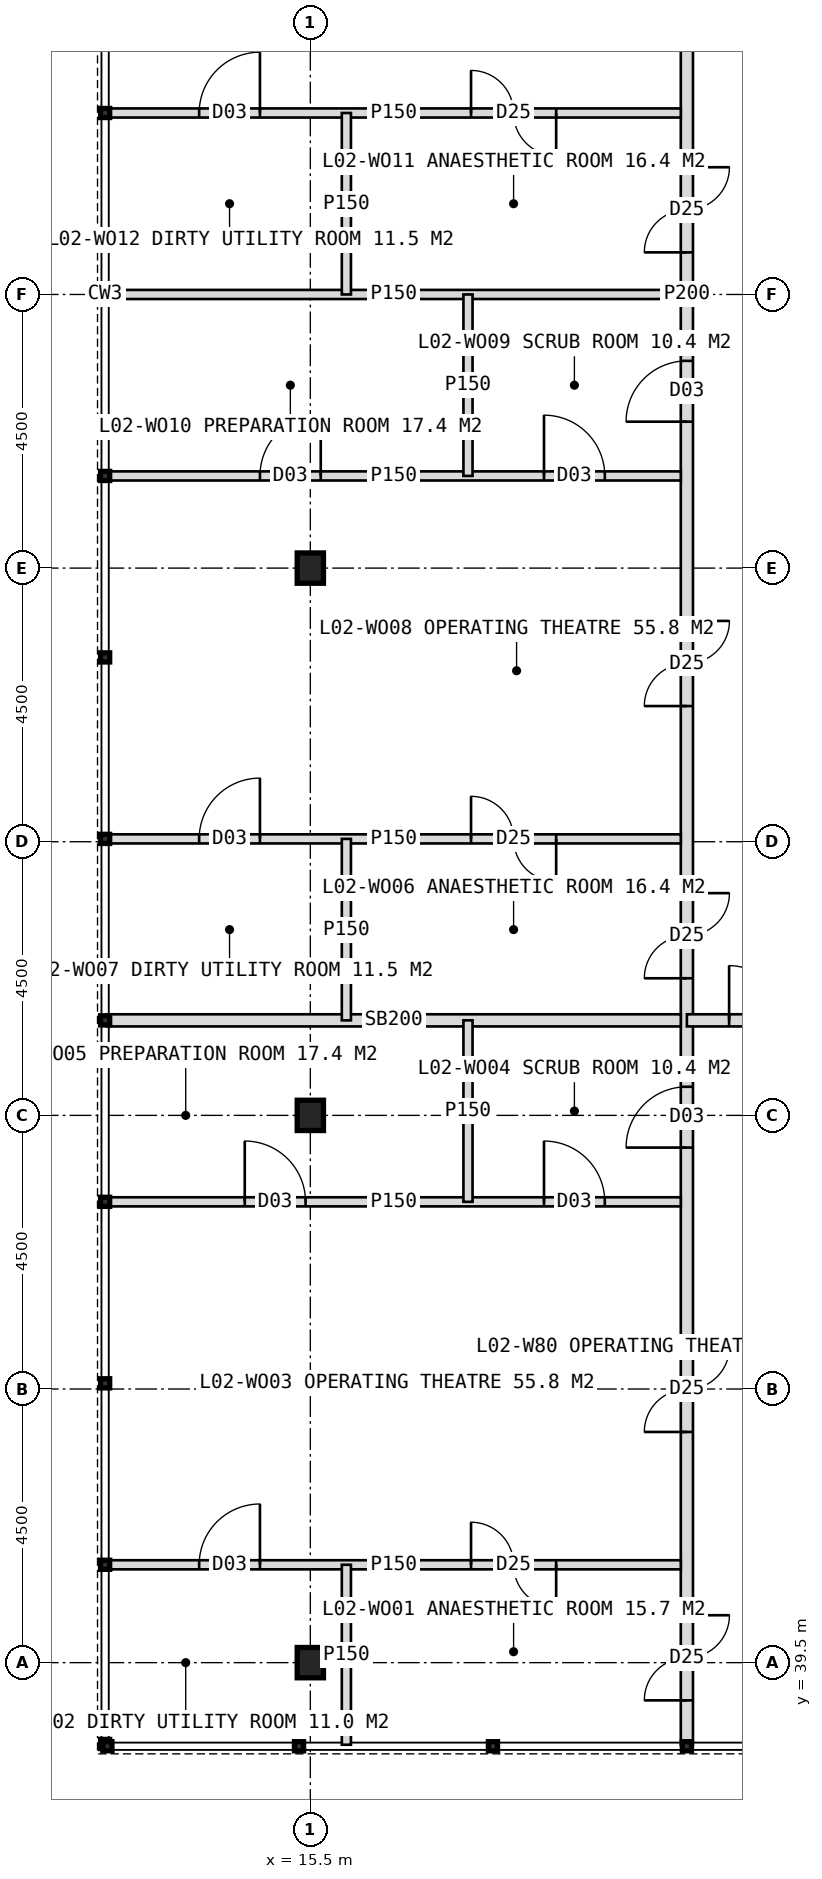
"""IFC4 building model, lengths in metres.
Left out: names, types, materials, properties, quantities, classifications, styles, units other than length and angle.
Written with IfcOpenShell. Run it as: python <this file> out.ifc"""

import sys

from ifc_helpers import new_model, si_unit, direction, frame, frame_2d, origin, origin_2d, place, context, subcontext, project, spatial, rectangle, i_section, extrude, element, fill, save


model = new_model("IFC4")
c1 = context("Model", 3, precision=1e-05, world=origin(), true_north=direction((0.0, 1.0)))
c2 = subcontext(c1, "Body", "Model", "MODEL_VIEW")
j1 = project(units=[si_unit("LENGTHUNIT", "METRE"), si_unit("PLANEANGLEUNIT", "RADIAN")], contexts=[c1])
p1 = place(None, origin())
s1 = spatial("IfcSite", under=j1, at=p1, CompositionType="ELEMENT")
p2 = place(p1, origin())
s2 = spatial("IfcBuilding", under=s1, at=p2, CompositionType="ELEMENT")
p3 = place(p2, frame((0.0, 0.0, 11.0)))
s3 = spatial("IfcBuildingStorey", under=s2, at=p3, CompositionType="ELEMENT", Elevation=11.0)
for number, where, z_axis, x_axis in (
    (1, (15.5, 39.5, 0.0), (0.0, 0.0, 1.0), (1.0, 0.0, 0.0)),
    (2, (15.5, 48.5, 0.0), (0.0, 0.0, 1.0), (1.0, 0.0, 0.0)),
    (3, (15.5, 57.5, 0.0), (0.0, 0.0, 1.0), (1.0, 0.0, 0.0)),
):
    element("IfcColumn", number, at=place(p3, frame(where, z_axis=z_axis, x_axis=x_axis)), inside=s3, PredefinedType="COLUMN", context=c2, shape_type="SweptSolid", body=[
        extrude(i_section(OverallWidth=0.432, OverallDepth=0.498, WebThickness=0.056, FlangeThickness=0.089, FilletRadius=0.015, at=origin_2d()), origin(), (0.0, 0.0, 1.0), 5.5),
    ])
p4 = place(p3, frame((21.693, 38.15, 0.0), z_axis=(0.0, 0.0, 1.0), x_axis=(0.0, 1.0, 0.0)))
e4 = element("IfcWall", 4, at=p4, inside=s3, PredefinedType="PARTITIONING", context=c2, shape_type="SweptSolid", body=[
    extrude(rectangle(XDim=47.7, YDim=0.2, at=frame_2d((23.85, 0.0))), origin(), (0.0, 0.0, 1.0), 5.2),
])
p5 = place(p4, frame((45.7, 0.0, 0.0)))
e5 = element("IfcOpeningElement", 5, at=p5, cuts=e4, PredefinedType="OPENING", context=c2, shape_type="SweptSolid", body=[
    extrude(rectangle(XDim=1.2, YDim=2.1, at=frame_2d((0.6, 1.05))), frame((0.0, 0.11, 0.0), z_axis=(0.0, -1.0, 0.0), x_axis=(1.0, 0.0, 0.0)), (0.0, 0.0, 1.0), 0.22),
])
p6 = place(p4, frame((36.244, 0.0, 0.0)))
e6 = element("IfcOpeningElement", 6, at=p6, cuts=e4, PredefinedType="OPENING", context=c2, shape_type="SweptSolid", body=[
    extrude(rectangle(XDim=1.0, YDim=2.1, at=frame_2d((0.5, 1.05))), frame((0.0, 0.11, 0.0), z_axis=(0.0, -1.0, 0.0), x_axis=(1.0, 0.0, 0.0)), (0.0, 0.0, 1.0), 0.22),
])
p7 = place(p4, frame((0.73, 0.0, 0.0)))
e7 = element("IfcOpeningElement", 7, at=p7, cuts=e4, PredefinedType="OPENING", context=c2, shape_type="SweptSolid", body=[
    extrude(rectangle(XDim=1.4, YDim=2.2, at=frame_2d((0.7, 1.1))), frame((0.0, 0.11, 0.0), z_axis=(0.0, -1.0, 0.0), x_axis=(1.0, 0.0, 0.0)), (0.0, 0.0, 1.0), 0.22),
])
p8 = place(p4, frame((5.144, 0.0, 0.0)))
e8 = element("IfcOpeningElement", 8, at=p8, cuts=e4, PredefinedType="OPENING", context=c2, shape_type="SweptSolid", body=[
    extrude(rectangle(XDim=1.4, YDim=2.2, at=frame_2d((0.7, 1.1))), frame((0.0, 0.11, 0.0), z_axis=(0.0, -1.0, 0.0), x_axis=(1.0, 0.0, 0.0)), (0.0, 0.0, 1.0), 0.22),
])
p9 = place(p4, frame((9.82, 0.0, 0.0)))
e9 = element("IfcOpeningElement", 9, at=p9, cuts=e4, PredefinedType="OPENING", context=c2, shape_type="SweptSolid", body=[
    extrude(rectangle(XDim=1.0, YDim=2.1, at=frame_2d((0.5, 1.05))), frame((0.0, 0.11, 0.0), z_axis=(0.0, -1.0, 0.0), x_axis=(1.0, 0.0, 0.0)), (0.0, 0.0, 1.0), 0.22),
])
p10 = place(p4, frame((12.605, 0.0, 0.0)))
e10 = element("IfcOpeningElement", 10, at=p10, cuts=e4, PredefinedType="OPENING", context=c2, shape_type="SweptSolid", body=[
    extrude(rectangle(XDim=1.4, YDim=2.2, at=frame_2d((0.7, 1.1))), frame((0.0, 0.11, 0.0), z_axis=(0.0, -1.0, 0.0), x_axis=(1.0, 0.0, 0.0)), (0.0, 0.0, 1.0), 0.22),
])
p11 = place(p4, frame((17.081, 0.0, 0.0)))
e11 = element("IfcOpeningElement", 11, at=p11, cuts=e4, PredefinedType="OPENING", context=c2, shape_type="SweptSolid", body=[
    extrude(rectangle(XDim=1.4, YDim=2.2, at=frame_2d((0.7, 1.1))), frame((0.0, 0.11, 0.0), z_axis=(0.0, -1.0, 0.0), x_axis=(1.0, 0.0, 0.0)), (0.0, 0.0, 1.0), 0.22),
])
p12 = place(p4, frame((21.758, 0.0, 0.0)))
e12 = element("IfcOpeningElement", 12, at=p12, cuts=e4, PredefinedType="OPENING", context=c2, shape_type="SweptSolid", body=[
    extrude(rectangle(XDim=1.0, YDim=2.1, at=frame_2d((0.5, 1.05))), frame((0.0, 0.11, 0.0), z_axis=(0.0, -1.0, 0.0), x_axis=(1.0, 0.0, 0.0)), (0.0, 0.0, 1.0), 0.22),
])
p13 = place(p4, frame((24.542, 0.0, 0.0)))
e13 = element("IfcOpeningElement", 13, at=p13, cuts=e4, PredefinedType="OPENING", context=c2, shape_type="SweptSolid", body=[
    extrude(rectangle(XDim=1.4, YDim=2.2, at=frame_2d((0.7, 1.1))), frame((0.0, 0.11, 0.0), z_axis=(0.0, -1.0, 0.0), x_axis=(1.0, 0.0, 0.0)), (0.0, 0.0, 1.0), 0.22),
])
p14 = place(p4, frame((29.019, 0.0, 0.0)))
e14 = element("IfcOpeningElement", 14, at=p14, cuts=e4, PredefinedType="OPENING", context=c2, shape_type="SweptSolid", body=[
    extrude(rectangle(XDim=1.4, YDim=2.2, at=frame_2d((0.7, 1.1))), frame((0.0, 0.11, 0.0), z_axis=(0.0, -1.0, 0.0), x_axis=(1.0, 0.0, 0.0)), (0.0, 0.0, 1.0), 0.22),
])
p15 = place(p4, frame((33.695, 0.0, 0.0)))
e15 = element("IfcOpeningElement", 15, at=p15, cuts=e4, PredefinedType="OPENING", context=c2, shape_type="SweptSolid", body=[
    extrude(rectangle(XDim=1.0, YDim=2.1, at=frame_2d((0.5, 1.05))), frame((0.0, 0.11, 0.0), z_axis=(0.0, -1.0, 0.0), x_axis=(1.0, 0.0, 0.0)), (0.0, 0.0, 1.0), 0.22),
])
p16 = place(p3, frame((21.693, 50.062, 0.0), z_axis=(0.0, 0.0, 1.0), x_axis=(1.0, 0.0, 0.0)))
e16 = element("IfcWall", 16, at=p16, inside=s3, PredefinedType="SOLIDWALL", context=c2, shape_type="SweptSolid", body=[
    extrude(rectangle(XDim=3.189, YDim=0.2, at=frame_2d((1.594, 0.0))), origin(), (0.0, 0.0, 1.0), 5.2),
])
p17 = place(p16, frame((0.695, 0.0, 0.0)))
e17 = element("IfcOpeningElement", 17, at=p17, cuts=e16, PredefinedType="OPENING", context=c2, shape_type="SweptSolid", body=[
    extrude(rectangle(XDim=1.8, YDim=2.2, at=frame_2d((0.9, 1.1))), frame((0.0, 0.11, 0.0), z_axis=(0.0, -1.0, 0.0), x_axis=(1.0, 0.0, 0.0)), (0.0, 0.0, 1.0), 0.22),
])
p18 = place(p3, frame((12.15, 41.109, 0.0), z_axis=(0.0, 0.0, 1.0), x_axis=(1.0, 0.0, 0.0)))
e18 = element("IfcWall", 18, at=p18, inside=s3, PredefinedType="PARTITIONING", context=c2, shape_type="SweptSolid", body=[
    extrude(rectangle(XDim=9.443, YDim=0.15, at=frame_2d((4.722, 0.0))), origin(), (0.0, 0.0, 1.0), 5.2),
])
p19 = place(p18, frame((5.993, 0.0, 0.0)))
e19 = element("IfcOpeningElement", 19, at=p19, cuts=e18, PredefinedType="OPENING", context=c2, shape_type="SweptSolid", body=[
    extrude(rectangle(XDim=1.4, YDim=2.2, at=frame_2d((0.7, 1.1))), frame((0.0, 0.085, 0.0), z_axis=(0.0, -1.0, 0.0), x_axis=(1.0, 0.0, 0.0)), (0.0, 0.0, 1.0), 0.17),
])
p20 = place(p18, frame((1.521, 0.0, 0.0)))
e20 = element("IfcOpeningElement", 20, at=p20, cuts=e18, PredefinedType="OPENING", context=c2, shape_type="SweptSolid", body=[
    extrude(rectangle(XDim=1.0, YDim=2.1, at=frame_2d((0.5, 1.05))), frame((0.0, 0.085, 0.0), z_axis=(0.0, -1.0, 0.0), x_axis=(1.0, 0.0, 0.0)), (0.0, 0.0, 1.0), 0.17),
])
p21 = place(p3, frame((12.15, 47.078, 0.0), z_axis=(0.0, 0.0, 1.0), x_axis=(1.0, 0.0, 0.0)))
e21 = element("IfcWall", 21, at=p21, inside=s3, PredefinedType="PARTITIONING", context=c2, shape_type="SweptSolid", body=[
    extrude(rectangle(XDim=9.443, YDim=0.15, at=frame_2d((4.722, 0.0))), origin(), (0.0, 0.0, 1.0), 5.2),
])
p22 = place(p21, frame((7.193, 0.0, 0.0)))
e22 = element("IfcOpeningElement", 22, at=p22, cuts=e21, PredefinedType="OPENING", context=c2, shape_type="SweptSolid", body=[
    extrude(rectangle(XDim=1.0, YDim=2.1, at=frame_2d((0.5, 1.05))), frame((0.0, 0.085, 0.0), z_axis=(0.0, -1.0, 0.0), x_axis=(1.0, 0.0, 0.0)), (0.0, 0.0, 1.0), 0.17),
])
p23 = place(p21, frame((2.271, 0.0, 0.0)))
e23 = element("IfcOpeningElement", 23, at=p23, cuts=e21, PredefinedType="OPENING", context=c2, shape_type="SweptSolid", body=[
    extrude(rectangle(XDim=1.0, YDim=2.1, at=frame_2d((0.5, 1.05))), frame((0.0, 0.085, 0.0), z_axis=(0.0, -1.0, 0.0), x_axis=(1.0, 0.0, 0.0)), (0.0, 0.0, 1.0), 0.17),
])
p24 = place(p3, frame((12.15, 50.062, 0.0), z_axis=(0.0, 0.0, 1.0), x_axis=(1.0, 0.0, 0.0)))
e24 = element("IfcWall", 24, at=p24, inside=s3, PredefinedType="SOLIDWALL", context=c2, shape_type="SweptSolid", body=[
    extrude(rectangle(XDim=9.443, YDim=0.2, at=frame_2d((4.722, 0.0))), origin(), (0.0, 0.0, 1.0), 5.2),
])
p25 = place(p3, frame((12.15, 53.047, 0.0), z_axis=(0.0, 0.0, 1.0), x_axis=(1.0, 0.0, 0.0)))
e25 = element("IfcWall", 25, at=p25, inside=s3, PredefinedType="PARTITIONING", context=c2, shape_type="SweptSolid", body=[
    extrude(rectangle(XDim=9.443, YDim=0.15, at=frame_2d((4.722, 0.0))), origin(), (0.0, 0.0, 1.0), 5.2),
])
p26 = place(p25, frame((5.993, 0.0, 0.0)))
e26 = element("IfcOpeningElement", 26, at=p26, cuts=e25, PredefinedType="OPENING", context=c2, shape_type="SweptSolid", body=[
    extrude(rectangle(XDim=1.4, YDim=2.2, at=frame_2d((0.7, 1.1))), frame((0.0, 0.085, 0.0), z_axis=(0.0, -1.0, 0.0), x_axis=(1.0, 0.0, 0.0)), (0.0, 0.0, 1.0), 0.17),
])
p27 = place(p25, frame((1.521, 0.0, 0.0)))
e27 = element("IfcOpeningElement", 27, at=p27, cuts=e25, PredefinedType="OPENING", context=c2, shape_type="SweptSolid", body=[
    extrude(rectangle(XDim=1.0, YDim=2.1, at=frame_2d((0.5, 1.05))), frame((0.0, 0.085, 0.0), z_axis=(0.0, -1.0, 0.0), x_axis=(1.0, 0.0, 0.0)), (0.0, 0.0, 1.0), 0.17),
])
p28 = place(p3, frame((12.15, 59.016, 0.0), z_axis=(0.0, 0.0, 1.0), x_axis=(1.0, 0.0, 0.0)))
e28 = element("IfcWall", 28, at=p28, inside=s3, PredefinedType="PARTITIONING", context=c2, shape_type="SweptSolid", body=[
    extrude(rectangle(XDim=9.443, YDim=0.15, at=frame_2d((4.722, 0.0))), origin(), (0.0, 0.0, 1.0), 5.2),
])
p29 = place(p28, frame((7.193, 0.0, 0.0)))
e29 = element("IfcOpeningElement", 29, at=p29, cuts=e28, PredefinedType="OPENING", context=c2, shape_type="SweptSolid", body=[
    extrude(rectangle(XDim=1.0, YDim=2.1, at=frame_2d((0.5, 1.05))), frame((0.0, 0.085, 0.0), z_axis=(0.0, -1.0, 0.0), x_axis=(1.0, 0.0, 0.0)), (0.0, 0.0, 1.0), 0.17),
])
p30 = place(p28, frame((2.521, 0.0, 0.0)))
e30 = element("IfcOpeningElement", 30, at=p30, cuts=e28, PredefinedType="OPENING", context=c2, shape_type="SweptSolid", body=[
    extrude(rectangle(XDim=1.0, YDim=2.1, at=frame_2d((0.5, 1.05))), frame((0.0, 0.085, 0.0), z_axis=(0.0, -1.0, 0.0), x_axis=(1.0, 0.0, 0.0)), (0.0, 0.0, 1.0), 0.17),
])
p31 = place(p3, frame((12.15, 62.0, 0.0), z_axis=(0.0, 0.0, 1.0), x_axis=(1.0, 0.0, 0.0)))
e31 = element("IfcWall", 31, at=p31, inside=s3, PredefinedType="PARTITIONING", context=c2, shape_type="SweptSolid", body=[
    extrude(rectangle(XDim=9.443, YDim=0.15, at=frame_2d((4.722, 0.0))), origin(), (0.0, 0.0, 1.0), 5.2),
])
p32 = place(p3, frame((12.15, 64.984, 0.0), z_axis=(0.0, 0.0, 1.0), x_axis=(1.0, 0.0, 0.0)))
e32 = element("IfcWall", 32, at=p32, inside=s3, PredefinedType="PARTITIONING", context=c2, shape_type="SweptSolid", body=[
    extrude(rectangle(XDim=9.443, YDim=0.15, at=frame_2d((4.722, 0.0))), origin(), (0.0, 0.0, 1.0), 5.2),
])
p33 = place(p32, frame((5.993, 0.0, 0.0)))
e33 = element("IfcOpeningElement", 33, at=p33, cuts=e32, PredefinedType="OPENING", context=c2, shape_type="SweptSolid", body=[
    extrude(rectangle(XDim=1.4, YDim=2.2, at=frame_2d((0.7, 1.1))), frame((0.0, 0.085, 0.0), z_axis=(0.0, -1.0, 0.0), x_axis=(1.0, 0.0, 0.0)), (0.0, 0.0, 1.0), 0.17),
])
p34 = place(p32, frame((1.521, 0.0, 0.0)))
e34 = element("IfcOpeningElement", 34, at=p34, cuts=e32, PredefinedType="OPENING", context=c2, shape_type="SweptSolid", body=[
    extrude(rectangle(XDim=1.0, YDim=2.1, at=frame_2d((0.5, 1.05))), frame((0.0, 0.085, 0.0), z_axis=(0.0, -1.0, 0.0), x_axis=(1.0, 0.0, 0.0)), (0.0, 0.0, 1.0), 0.17),
])
p35 = place(p3, frame((16.093, 38.15, 0.0), z_axis=(0.0, 0.0, 1.0), x_axis=(0.0, 1.0, 0.0)))
e35 = element("IfcWall", 35, at=p35, inside=s3, PredefinedType="PARTITIONING", context=c2, shape_type="SweptSolid", body=[
    extrude(rectangle(XDim=2.959, YDim=0.15, at=frame_2d((1.48, 0.0))), origin(), (0.0, 0.0, 1.0), 5.2),
])
for number, where, z_axis, x_axis in (
    (36, (16.093, 50.062, 0.0), (0.0, 0.0, 1.0), (0.0, 1.0, 0.0)),
    (37, (16.093, 62.0, 0.0), (0.0, 0.0, 1.0), (0.0, 1.0, 0.0)),
    (38, (18.093, 47.078, 0.0), (0.0, 0.0, 1.0), (0.0, 1.0, 0.0)),
    (39, (18.093, 59.016, 0.0), (0.0, 0.0, 1.0), (0.0, 1.0, 0.0)),
):
    element("IfcWall", number, at=place(p3, frame(where, z_axis=z_axis, x_axis=x_axis)), inside=s3, PredefinedType="PARTITIONING", context=c2, shape_type="SweptSolid", body=[
        extrude(rectangle(XDim=2.984, YDim=0.15, at=frame_2d((1.492, 0.0))), origin(), (0.0, 0.0, 1.0), 5.2),
    ])
p36 = place(p17, origin())
e40 = element("IfcDoor", 40, at=p36, inside=s3, OperationType="DOUBLE_DOOR_DOUBLE_SWING", PredefinedType="DOOR", context=c2, shape_type="SweptSolid", body=[
    extrude(rectangle(XDim=1.8, YDim=2.2, at=frame_2d((0.9, 1.1))), frame((0.0, 0.025, 0.0), z_axis=(0.0, -1.0, 0.0), x_axis=(1.0, 0.0, 0.0)), (0.0, 0.0, 1.0), 0.05),
])
fill(e17, e40)
p37 = place(p7, origin())
e41 = element("IfcDoor", 41, at=p37, inside=s3, OperationType="DOUBLE_DOOR_SINGLE_SWING", PredefinedType="DOOR", context=c2, shape_type="SweptSolid", body=[
    extrude(rectangle(XDim=1.4, YDim=2.2, at=frame_2d((0.7, 1.1))), frame((0.0, 0.025, 0.0), z_axis=(0.0, -1.0, 0.0), x_axis=(1.0, 0.0, 0.0)), (0.0, 0.0, 1.0), 0.05),
])
fill(e7, e41)
p38 = place(p19, origin())
e42 = element("IfcDoor", 42, at=p38, inside=s3, OperationType="DOUBLE_DOOR_SINGLE_SWING", PredefinedType="DOOR", context=c2, shape_type="SweptSolid", body=[
    extrude(rectangle(XDim=1.4, YDim=2.2, at=frame_2d((0.7, 1.1))), frame((0.0, 0.025, 0.0), z_axis=(0.0, -1.0, 0.0), x_axis=(1.0, 0.0, 0.0)), (0.0, 0.0, 1.0), 0.05),
])
fill(e19, e42)
p39 = place(p20, origin())
e43 = element("IfcDoor", 43, at=p39, inside=s3, OperationType="SINGLE_SWING_RIGHT", PredefinedType="DOOR", context=c2, shape_type="SweptSolid", body=[
    extrude(rectangle(XDim=1.0, YDim=2.1, at=frame_2d((0.5, 1.05))), frame((0.0, 0.025, 0.0), z_axis=(0.0, -1.0, 0.0), x_axis=(1.0, 0.0, 0.0)), (0.0, 0.0, 1.0), 0.05),
])
fill(e20, e43)
p40 = place(p8, origin())
e44 = element("IfcDoor", 44, at=p40, inside=s3, OperationType="DOUBLE_DOOR_SINGLE_SWING", PredefinedType="DOOR", context=c2, shape_type="SweptSolid", body=[
    extrude(rectangle(XDim=1.4, YDim=2.2, at=frame_2d((0.7, 1.1))), frame((0.0, 0.025, 0.0), z_axis=(0.0, -1.0, 0.0), x_axis=(1.0, 0.0, 0.0)), (0.0, 0.0, 1.0), 0.05),
])
fill(e8, e44)
p41 = place(p9, origin())
e45 = element("IfcDoor", 45, at=p41, inside=s3, OperationType="SINGLE_SWING_LEFT", PredefinedType="DOOR", context=c2, shape_type="SweptSolid", body=[
    extrude(rectangle(XDim=1.0, YDim=2.1, at=frame_2d((0.5, 1.05))), frame((0.0, 0.025, 0.0), z_axis=(0.0, -1.0, 0.0), x_axis=(1.0, 0.0, 0.0)), (0.0, 0.0, 1.0), 0.05),
])
fill(e9, e45)
p42 = place(p22, origin())
e46 = element("IfcDoor", 46, at=p42, inside=s3, OperationType="SINGLE_SWING_LEFT", PredefinedType="DOOR", context=c2, shape_type="SweptSolid", body=[
    extrude(rectangle(XDim=1.0, YDim=2.1, at=frame_2d((0.5, 1.05))), frame((0.0, 0.025, 0.0), z_axis=(0.0, -1.0, 0.0), x_axis=(1.0, 0.0, 0.0)), (0.0, 0.0, 1.0), 0.05),
])
fill(e22, e46)
p43 = place(p23, origin())
e47 = element("IfcDoor", 47, at=p43, inside=s3, OperationType="SINGLE_SWING_LEFT", PredefinedType="DOOR", context=c2, shape_type="SweptSolid", body=[
    extrude(rectangle(XDim=1.0, YDim=2.1, at=frame_2d((0.5, 1.05))), frame((0.0, 0.025, 0.0), z_axis=(0.0, -1.0, 0.0), x_axis=(1.0, 0.0, 0.0)), (0.0, 0.0, 1.0), 0.05),
])
fill(e23, e47)
p44 = place(p10, origin())
e48 = element("IfcDoor", 48, at=p44, inside=s3, OperationType="DOUBLE_DOOR_SINGLE_SWING", PredefinedType="DOOR", context=c2, shape_type="SweptSolid", body=[
    extrude(rectangle(XDim=1.4, YDim=2.2, at=frame_2d((0.7, 1.1))), frame((0.0, 0.025, 0.0), z_axis=(0.0, -1.0, 0.0), x_axis=(1.0, 0.0, 0.0)), (0.0, 0.0, 1.0), 0.05),
])
fill(e10, e48)
p45 = place(p26, origin())
e49 = element("IfcDoor", 49, at=p45, inside=s3, OperationType="DOUBLE_DOOR_SINGLE_SWING", PredefinedType="DOOR", context=c2, shape_type="SweptSolid", body=[
    extrude(rectangle(XDim=1.4, YDim=2.2, at=frame_2d((0.7, 1.1))), frame((0.0, 0.025, 0.0), z_axis=(0.0, -1.0, 0.0), x_axis=(1.0, 0.0, 0.0)), (0.0, 0.0, 1.0), 0.05),
])
fill(e26, e49)
p46 = place(p27, origin())
e50 = element("IfcDoor", 50, at=p46, inside=s3, OperationType="SINGLE_SWING_RIGHT", PredefinedType="DOOR", context=c2, shape_type="SweptSolid", body=[
    extrude(rectangle(XDim=1.0, YDim=2.1, at=frame_2d((0.5, 1.05))), frame((0.0, 0.025, 0.0), z_axis=(0.0, -1.0, 0.0), x_axis=(1.0, 0.0, 0.0)), (0.0, 0.0, 1.0), 0.05),
])
fill(e27, e50)
p47 = place(p11, origin())
e51 = element("IfcDoor", 51, at=p47, inside=s3, OperationType="DOUBLE_DOOR_SINGLE_SWING", PredefinedType="DOOR", context=c2, shape_type="SweptSolid", body=[
    extrude(rectangle(XDim=1.4, YDim=2.2, at=frame_2d((0.7, 1.1))), frame((0.0, 0.025, 0.0), z_axis=(0.0, -1.0, 0.0), x_axis=(1.0, 0.0, 0.0)), (0.0, 0.0, 1.0), 0.05),
])
fill(e11, e51)
p48 = place(p12, origin())
e52 = element("IfcDoor", 52, at=p48, inside=s3, OperationType="SINGLE_SWING_LEFT", PredefinedType="DOOR", context=c2, shape_type="SweptSolid", body=[
    extrude(rectangle(XDim=1.0, YDim=2.1, at=frame_2d((0.5, 1.05))), frame((0.0, 0.025, 0.0), z_axis=(0.0, -1.0, 0.0), x_axis=(1.0, 0.0, 0.0)), (0.0, 0.0, 1.0), 0.05),
])
fill(e12, e52)
p49 = place(p29, origin())
e53 = element("IfcDoor", 53, at=p49, inside=s3, OperationType="SINGLE_SWING_LEFT", PredefinedType="DOOR", context=c2, shape_type="SweptSolid", body=[
    extrude(rectangle(XDim=1.0, YDim=2.1, at=frame_2d((0.5, 1.05))), frame((0.0, 0.025, 0.0), z_axis=(0.0, -1.0, 0.0), x_axis=(1.0, 0.0, 0.0)), (0.0, 0.0, 1.0), 0.05),
])
fill(e29, e53)
p50 = place(p30, origin())
e54 = element("IfcDoor", 54, at=p50, inside=s3, OperationType="SINGLE_SWING_RIGHT", PredefinedType="DOOR", context=c2, shape_type="SweptSolid", body=[
    extrude(rectangle(XDim=1.0, YDim=2.1, at=frame_2d((0.5, 1.05))), frame((0.0, 0.025, 0.0), z_axis=(0.0, -1.0, 0.0), x_axis=(1.0, 0.0, 0.0)), (0.0, 0.0, 1.0), 0.05),
])
fill(e30, e54)
p51 = place(p13, origin())
e55 = element("IfcDoor", 55, at=p51, inside=s3, OperationType="DOUBLE_DOOR_SINGLE_SWING", PredefinedType="DOOR", context=c2, shape_type="SweptSolid", body=[
    extrude(rectangle(XDim=1.4, YDim=2.2, at=frame_2d((0.7, 1.1))), frame((0.0, 0.025, 0.0), z_axis=(0.0, -1.0, 0.0), x_axis=(1.0, 0.0, 0.0)), (0.0, 0.0, 1.0), 0.05),
])
fill(e13, e55)
p52 = place(p33, origin())
e56 = element("IfcDoor", 56, at=p52, inside=s3, OperationType="DOUBLE_DOOR_SINGLE_SWING", PredefinedType="DOOR", context=c2, shape_type="SweptSolid", body=[
    extrude(rectangle(XDim=1.4, YDim=2.2, at=frame_2d((0.7, 1.1))), frame((0.0, 0.025, 0.0), z_axis=(0.0, -1.0, 0.0), x_axis=(1.0, 0.0, 0.0)), (0.0, 0.0, 1.0), 0.05),
])
fill(e33, e56)
p53 = place(p34, origin())
e57 = element("IfcDoor", 57, at=p53, inside=s3, OperationType="SINGLE_SWING_RIGHT", PredefinedType="DOOR", context=c2, shape_type="SweptSolid", body=[
    extrude(rectangle(XDim=1.0, YDim=2.1, at=frame_2d((0.5, 1.05))), frame((0.0, 0.025, 0.0), z_axis=(0.0, -1.0, 0.0), x_axis=(1.0, 0.0, 0.0)), (0.0, 0.0, 1.0), 0.05),
])
fill(e34, e57)
save(model, sys.argv[1])
